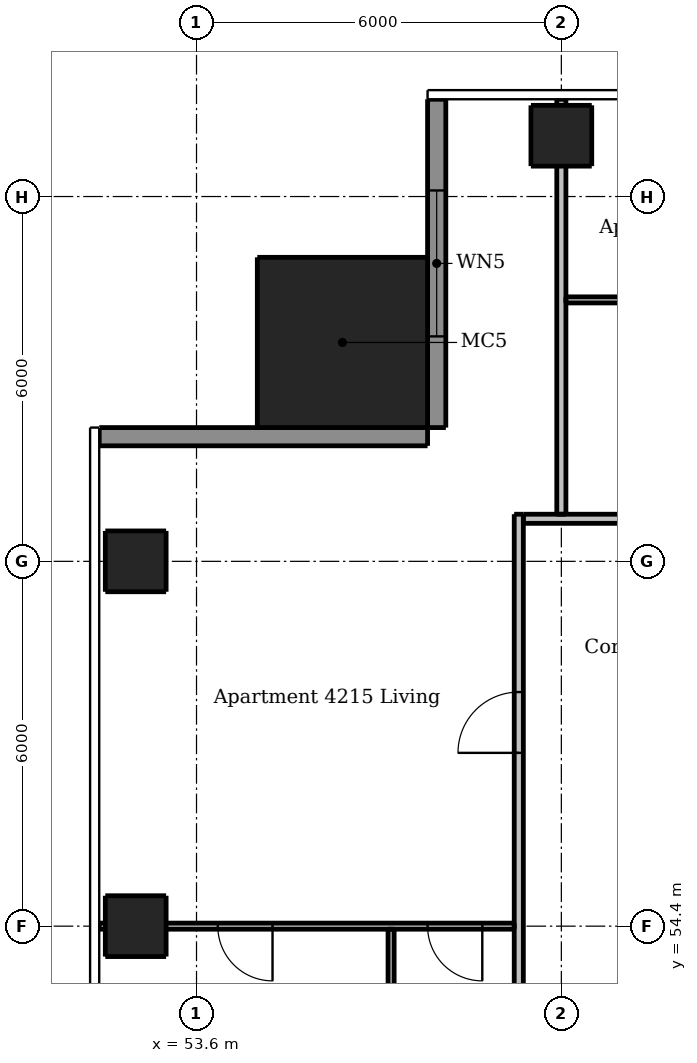
"""IFC4 building model, lengths in metres.
Left out: names, types, materials, properties, quantities, classifications, styles, units other than length and angle.
Written with IfcOpenShell. Run it as: python <this file> out.ifc"""

import sys

from ifc_helpers import new_model, si_unit, direction, frame, frame_2d, origin, origin_2d, place, context, subcontext, project, spatial, rectangle, extrude, element, fill, save


model = new_model("IFC4")
c1 = context("Model", 3, precision=1e-05, world=origin(), true_north=direction((0.0, 1.0)))
c2 = subcontext(c1, "Body", "Model", "MODEL_VIEW")
j1 = project(units=[si_unit("LENGTHUNIT", "METRE"), si_unit("PLANEANGLEUNIT", "RADIAN")], contexts=[c1])
p1 = place(None, origin())
s1 = spatial("IfcSite", under=j1, at=p1, CompositionType="ELEMENT")
p2 = place(p1, origin())
s2 = spatial("IfcBuilding", under=s1, at=p2, CompositionType="ELEMENT")
p3 = place(p2, frame((0.0, 0.0, 158.2)))
s3 = spatial("IfcBuildingStorey", under=s2, at=p3, CompositionType="ELEMENT", Elevation=158.2)
for number, where, z_axis, x_axis in (
    (1, (59.6, 67.4, 0.0), (0.0, 0.0, 1.0), (1.0, 0.0, 0.0)),
    (2, (52.6, 54.4, 0.0), (0.0, 0.0, 1.0), (1.0, 0.0, 0.0)),
    (3, (52.6, 60.4, 0.0), (0.0, 0.0, 1.0), (1.0, 0.0, 0.0)),
):
    element("IfcColumn", number, at=place(p3, frame(where, z_axis=z_axis, x_axis=x_axis)), inside=s3, PredefinedType="COLUMN", context=c2, shape_type="SweptSolid", body=[
        extrude(rectangle(XDim=1.0, YDim=1.0, at=origin_2d()), origin(), (0.0, 0.0, 1.0), 3.05),
    ])
p4 = place(p3, frame((56.0, 64.0, 0.0), z_axis=(0.0, 0.0, 1.0), x_axis=(1.0, 0.0, 0.0)))
e4 = element("IfcColumn", 4, at=p4, inside=s3, PredefinedType="COLUMN", context=c2, shape_type="SweptSolid", body=[
    extrude(rectangle(XDim=2.8, YDim=2.8, at=origin_2d()), origin(), (0.0, 0.0, 1.0), 3.3),
])
p5 = place(p3, frame((57.55, 68.0, 0.0), z_axis=(0.0, 0.0, 1.0), x_axis=(0.0, -1.0, 0.0)))
e5 = element("IfcWall", 5, at=p5, inside=s3, PredefinedType="SOLIDWALL", context=c2, shape_type="SweptSolid", body=[
    extrude(rectangle(XDim=5.4, YDim=0.3, at=frame_2d((2.7, 0.0))), origin(), (0.0, 0.0, 1.0), 3.05),
])
p6 = place(p5, frame((1.5, 0.0, 0.15)))
e6 = element("IfcOpeningElement", 6, at=p6, cuts=e5, PredefinedType="OPENING", context=c2, shape_type="SweptSolid", body=[
    extrude(rectangle(XDim=2.4, YDim=2.1, at=frame_2d((1.2, 1.05))), frame((0.0, 0.16, 0.0), z_axis=(0.0, -1.0, 0.0), x_axis=(1.0, 0.0, 0.0)), (0.0, 0.0, 1.0), 0.32),
])
p7 = place(p3, frame((57.4, 62.45, 0.0), z_axis=(0.0, 0.0, 1.0), x_axis=(-1.0, 0.0, 0.0)))
e7 = element("IfcWall", 7, at=p7, inside=s3, PredefinedType="SOLIDWALL", context=c2, shape_type="SweptSolid", body=[
    extrude(rectangle(XDim=5.4, YDim=0.3, at=frame_2d((2.7, 0.0))), origin(), (0.0, 0.0, 1.0), 3.05),
])
p8 = place(p3, frame((56.8, 54.35, 0.0), z_axis=(0.0, 0.0, 1.0), x_axis=(0.0, -1.0, 0.0)))
e8 = element("IfcWall", 8, at=p8, inside=s3, PredefinedType="PARTITIONING", context=c2, shape_type="SweptSolid", body=[
    extrude(rectangle(XDim=5.875, YDim=0.1, at=frame_2d((2.938, 0.0))), origin(), (0.0, 0.0, 1.0), 3.05),
])
p9 = place(p8, frame((3.75, 0.0, 0.0)))
e9 = element("IfcOpeningElement", 9, at=p9, cuts=e8, PredefinedType="OPENING", context=c2, shape_type="SweptSolid", body=[
    extrude(rectangle(XDim=0.8, YDim=2.1, at=frame_2d((0.4, 1.05))), frame((0.0, 0.06, 0.0), z_axis=(0.0, -1.0, 0.0), x_axis=(1.0, 0.0, 0.0)), (0.0, 0.0, 1.0), 0.12),
])
p10 = place(p3, frame((59.675, 64.7, 0.0), z_axis=(0.0, 0.0, 1.0), x_axis=(1.0, 0.0, 0.0)))
e10 = element("IfcWall", 10, at=p10, inside=s3, PredefinedType="PARTITIONING", context=c2, shape_type="SweptSolid", body=[
    extrude(rectangle(XDim=1.975, YDim=0.1, at=frame_2d((0.987, 0.0))), origin(), (0.0, 0.0, 1.0), 3.05),
])
p11 = place(p3, frame((58.825, 54.4, 0.0), z_axis=(0.0, 0.0, 1.0), x_axis=(-1.0, 0.0, 0.0)))
e11 = element("IfcWall", 11, at=p11, inside=s3, PredefinedType="PARTITIONING", context=c2, shape_type="SweptSolid", body=[
    extrude(rectangle(XDim=6.825, YDim=0.1, at=frame_2d((3.413, 0.0))), origin(), (0.0, 0.0, 1.0), 2.516),
])
p12 = place(p11, frame((0.525, 0.0, 0.0)))
e12 = element("IfcOpeningElement", 12, at=p12, cuts=e11, PredefinedType="OPENING", context=c2, shape_type="SweptSolid", body=[
    extrude(rectangle(XDim=0.9, YDim=2.1, at=frame_2d((0.45, 1.05))), frame((0.0, 0.06, 0.0), z_axis=(0.0, -1.0, 0.0), x_axis=(1.0, 0.0, 0.0)), (0.0, 0.0, 1.0), 0.12),
])
p13 = place(p11, frame((3.975, 0.0, 0.0)))
e13 = element("IfcOpeningElement", 13, at=p13, cuts=e11, PredefinedType="OPENING", context=c2, shape_type="SweptSolid", body=[
    extrude(rectangle(XDim=0.9, YDim=2.1, at=frame_2d((0.45, 1.05))), frame((0.0, 0.06, 0.0), z_axis=(0.0, -1.0, 0.0), x_axis=(1.0, 0.0, 0.0)), (0.0, 0.0, 1.0), 0.12),
])
p14 = place(p3, frame((58.9, 30.325, 0.0), z_axis=(0.0, 0.0, 1.0), x_axis=(0.0, 1.0, 0.0)))
e14 = element("IfcWall", 14, at=p14, inside=s3, PredefinedType="PARTITIONING", context=c2, shape_type="SweptSolid", body=[
    extrude(rectangle(XDim=30.85, YDim=0.15, at=frame_2d((15.425, 0.0))), origin(), (0.0, 0.0, 1.0), 3.05),
])
p15 = place(p14, frame((2.575, 0.0, 0.0)))
e15 = element("IfcOpeningElement", 15, at=p15, cuts=e14, PredefinedType="OPENING", context=c2, shape_type="SweptSolid", body=[
    extrude(rectangle(XDim=1.0, YDim=2.1, at=frame_2d((0.5, 1.05))), frame((0.0, 0.085, 0.0), z_axis=(0.0, -1.0, 0.0), x_axis=(1.0, 0.0, 0.0)), (0.0, 0.0, 1.0), 0.17),
])
p16 = place(p14, frame((8.575, 0.0, 0.0)))
e16 = element("IfcOpeningElement", 16, at=p16, cuts=e14, PredefinedType="OPENING", context=c2, shape_type="SweptSolid", body=[
    extrude(rectangle(XDim=1.0, YDim=2.1, at=frame_2d((0.5, 1.05))), frame((0.0, 0.085, 0.0), z_axis=(0.0, -1.0, 0.0), x_axis=(1.0, 0.0, 0.0)), (0.0, 0.0, 1.0), 0.17),
])
p17 = place(p14, frame((14.575, 0.0, 0.0)))
e17 = element("IfcOpeningElement", 17, at=p17, cuts=e14, PredefinedType="OPENING", context=c2, shape_type="SweptSolid", body=[
    extrude(rectangle(XDim=1.0, YDim=2.1, at=frame_2d((0.5, 1.05))), frame((0.0, 0.085, 0.0), z_axis=(0.0, -1.0, 0.0), x_axis=(1.0, 0.0, 0.0)), (0.0, 0.0, 1.0), 0.17),
])
p18 = place(p14, frame((26.925, 0.0, 0.0)))
e18 = element("IfcOpeningElement", 18, at=p18, cuts=e14, PredefinedType="OPENING", context=c2, shape_type="SweptSolid", body=[
    extrude(rectangle(XDim=1.0, YDim=2.1, at=frame_2d((0.5, 1.05))), frame((0.0, 0.085, 0.0), z_axis=(0.0, -1.0, 0.0), x_axis=(1.0, 0.0, 0.0)), (0.0, 0.0, 1.0), 0.17),
])
p19 = place(p3, frame((59.6, 61.175, 0.0), z_axis=(0.0, 0.0, 1.0), x_axis=(0.0, 1.0, 0.0)))
e19 = element("IfcWall", 19, at=p19, inside=s3, PredefinedType="PARTITIONING", context=c2, shape_type="SweptSolid", body=[
    extrude(rectangle(XDim=6.825, YDim=0.15, at=frame_2d((3.413, 0.0))), origin(), (0.0, 0.0, 1.0), 2.51),
])
p20 = place(p3, frame((58.975, 61.1, 0.0), z_axis=(0.0, 0.0, 1.0), x_axis=(1.0, 0.0, 0.0)))
e20 = element("IfcWall", 20, at=p20, inside=s3, PredefinedType="PARTITIONING", context=c2, shape_type="SweptSolid", body=[
    extrude(rectangle(XDim=29.25, YDim=0.15, at=frame_2d((14.625, 0.0))), origin(), (0.0, 0.0, 1.0), 3.05),
])
p21 = place(p20, frame((3.125, 0.0, 0.0)))
e21 = element("IfcOpeningElement", 21, at=p21, cuts=e20, PredefinedType="OPENING", context=c2, shape_type="SweptSolid", body=[
    extrude(rectangle(XDim=1.0, YDim=2.1, at=frame_2d((0.5, 1.05))), frame((0.0, 0.085, 0.0), z_axis=(0.0, -1.0, 0.0), x_axis=(1.0, 0.0, 0.0)), (0.0, 0.0, 1.0), 0.17),
])
p22 = place(p20, frame((9.125, 0.0, 0.0)))
e22 = element("IfcOpeningElement", 22, at=p22, cuts=e20, PredefinedType="OPENING", context=c2, shape_type="SweptSolid", body=[
    extrude(rectangle(XDim=1.0, YDim=2.1, at=frame_2d((0.5, 1.05))), frame((0.0, 0.085, 0.0), z_axis=(0.0, -1.0, 0.0), x_axis=(1.0, 0.0, 0.0)), (0.0, 0.0, 1.0), 0.17),
])
p23 = place(p20, frame((15.125, 0.0, 0.0)))
e23 = element("IfcOpeningElement", 23, at=p23, cuts=e20, PredefinedType="OPENING", context=c2, shape_type="SweptSolid", body=[
    extrude(rectangle(XDim=1.0, YDim=2.1, at=frame_2d((0.5, 1.05))), frame((0.0, 0.085, 0.0), z_axis=(0.0, -1.0, 0.0), x_axis=(1.0, 0.0, 0.0)), (0.0, 0.0, 1.0), 0.17),
])
p24 = place(p20, frame((26.475, 0.0, 0.0)))
e24 = element("IfcOpeningElement", 24, at=p24, cuts=e20, PredefinedType="OPENING", context=c2, shape_type="SweptSolid", body=[
    extrude(rectangle(XDim=1.0, YDim=2.1, at=frame_2d((0.5, 1.05))), frame((0.0, 0.085, 0.0), z_axis=(0.0, -1.0, 0.0), x_axis=(1.0, 0.0, 0.0)), (0.0, 0.0, 1.0), 0.17),
])
p25 = place(p6, origin())
e25 = element("IfcWindow", 25, at=p25, inside=s3, PartitioningType="DOUBLE_PANEL_VERTICAL", PredefinedType="WINDOW", context=c2, shape_type="SweptSolid", body=[
    extrude(rectangle(XDim=2.4, YDim=2.1, at=frame_2d((1.2, 1.05))), frame((0.0, 0.03, 0.0), z_axis=(0.0, -1.0, 0.0), x_axis=(1.0, 0.0, 0.0)), (0.0, 0.0, 1.0), 0.06),
])
fill(e6, e25)
p26 = place(p18, origin())
e26 = element("IfcDoor", 26, at=p26, inside=s3, OperationType="SINGLE_SWING_LEFT", PredefinedType="DOOR", context=c2, shape_type="SweptSolid", body=[
    extrude(rectangle(XDim=1.0, YDim=2.1, at=frame_2d((0.5, 1.05))), frame((0.0, 0.025, 0.0), z_axis=(0.0, -1.0, 0.0), x_axis=(1.0, 0.0, 0.0)), (0.0, 0.0, 1.0), 0.05),
])
fill(e18, e26)
p27 = place(p12, origin())
e27 = element("IfcDoor", 27, at=p27, inside=s3, OperationType="SINGLE_SWING_LEFT", PredefinedType="DOOR", context=c2, shape_type="SweptSolid", body=[
    extrude(rectangle(XDim=0.9, YDim=2.1, at=frame_2d((0.45, 1.05))), frame((0.0, 0.025, 0.0), z_axis=(0.0, -1.0, 0.0), x_axis=(1.0, 0.0, 0.0)), (0.0, 0.0, 1.0), 0.05),
])
fill(e12, e27)
p28 = place(p13, origin())
e28 = element("IfcDoor", 28, at=p28, inside=s3, OperationType="SINGLE_SWING_LEFT", PredefinedType="DOOR", context=c2, shape_type="SweptSolid", body=[
    extrude(rectangle(XDim=0.9, YDim=2.1, at=frame_2d((0.45, 1.05))), frame((0.0, 0.025, 0.0), z_axis=(0.0, -1.0, 0.0), x_axis=(1.0, 0.0, 0.0)), (0.0, 0.0, 1.0), 0.05),
])
fill(e13, e28)
save(model, sys.argv[1])
